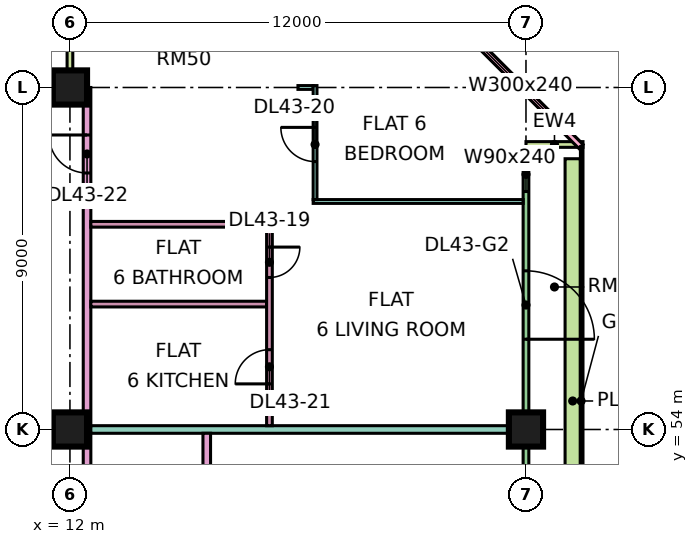
"""IFC4 building model, lengths in metres.
Left out: names, types, materials, properties, quantities, classifications, styles, units other than length and angle.
Written with IfcOpenShell. Run it as: python <this file> out.ifc"""

import sys

from ifc_helpers import new_model, si_unit, direction, frame, frame_2d, origin, origin_2d, place, context, subcontext, project, spatial, rectangle, extrude, element, fill, save


model = new_model("IFC4")
c1 = context("Model", 3, precision=1e-05, world=origin(), true_north=direction((0.0, 1.0)))
c2 = subcontext(c1, "Body", "Model", "MODEL_VIEW")
j1 = project(units=[si_unit("LENGTHUNIT", "METRE"), si_unit("PLANEANGLEUNIT", "RADIAN")], contexts=[c1])
p1 = place(None, origin())
s1 = spatial("IfcSite", under=j1, at=p1, CompositionType="ELEMENT")
p2 = place(p1, origin())
s2 = spatial("IfcBuilding", under=s1, at=p2, CompositionType="ELEMENT")
p3 = place(p2, frame((0.0, 0.0, 187.4)))
s3 = spatial("IfcBuildingStorey", under=s2, at=p3, CompositionType="ELEMENT", Elevation=187.4)
for number, where, z_axis, x_axis in (
    (1, (12.0, 54.0, 0.0), (0.0, 0.0, 1.0), (1.0, 0.0, 0.0)),
    (2, (12.0, 63.0, 0.0), (0.0, 0.0, 1.0), (1.0, 0.0, 0.0)),
    (3, (24.0, 54.0, 0.0), (0.0, 0.0, 1.0), (1.0, 0.0, 0.0)),
):
    element("IfcColumn", number, at=place(p3, frame(where, z_axis=z_axis, x_axis=x_axis)), inside=s3, PredefinedType="COLUMN", context=c2, shape_type="SweptSolid", body=[
        extrude(rectangle(XDim=0.9, YDim=0.9, at=origin_2d()), origin(), (0.0, 0.0, 1.0), 3.75),
    ])
p4 = place(p3, frame((24.0, 48.075, 0.0), z_axis=(0.0, 0.0, 1.0), x_axis=(0.0, 1.0, 0.0)))
e4 = element("IfcWall", 4, at=p4, inside=s3, PredefinedType="SOLIDWALL", context=c2, shape_type="SweptSolid", body=[
    extrude(rectangle(XDim=13.35, YDim=0.15, at=frame_2d((6.675, 0.0))), origin(), (0.0, 0.0, 1.0), 3.35),
])
p5 = place(p4, frame((0.587, 0.0, 0.45)))
e5 = element("IfcOpeningElement", 5, at=p5, cuts=e4, PredefinedType="OPENING", context=c2, shape_type="SweptSolid", body=[
    extrude(rectangle(XDim=4.2, YDim=2.4, at=frame_2d((2.1, 1.2))), frame((0.0, 0.085, 0.0), z_axis=(0.0, -1.0, 0.0), x_axis=(1.0, 0.0, 0.0)), (0.0, 0.0, 1.0), 0.17),
])
p6 = place(p4, frame((8.3, 0.0, 0.0)))
e6 = element("IfcOpeningElement", 6, at=p6, cuts=e4, PredefinedType="OPENING", context=c2, shape_type="SweptSolid", body=[
    extrude(rectangle(XDim=1.8, YDim=2.4, at=frame_2d((0.9, 1.2))), frame((0.0, 0.085, 0.0), z_axis=(0.0, -1.0, 0.0), x_axis=(1.0, 0.0, 0.0)), (0.0, 0.0, 1.0), 0.17),
])
p7 = place(p4, frame((12.188, 0.0, 0.45)))
e7 = element("IfcOpeningElement", 7, at=p7, cuts=e4, PredefinedType="OPENING", context=c2, shape_type="SweptSolid", body=[
    extrude(rectangle(XDim=0.9, YDim=2.4, at=frame_2d((0.45, 1.2))), frame((0.0, 0.085, 0.0), z_axis=(0.0, -1.0, 0.0), x_axis=(1.0, 0.0, 0.0)), (0.0, 0.0, 1.0), 0.17),
])
p8 = place(p3, frame((25.5, 61.5, 0.0), z_axis=(0.0, 0.0, 1.0), x_axis=(-1.0, 0.0, 0.0)))
e8 = element("IfcWall", 8, at=p8, inside=s3, PredefinedType="SOLIDWALL", context=c2, shape_type="SweptSolid", body=[
    extrude(rectangle(XDim=1.5, YDim=0.15, at=frame_2d((0.75, 0.0))), origin(), (0.0, 0.0, 1.0), 3.35),
])
p9 = place(p3, frame((25.447, 61.447, 0.0), z_axis=(0.0, 0.0, 1.0), x_axis=(-0.707106781187, 0.707106781187, 0.0)))
e9 = element("IfcWall", 9, at=p9, inside=s3, PredefinedType="SOLIDWALL", context=c2, shape_type="SweptSolid", body=[
    extrude(rectangle(XDim=4.243, YDim=0.15, at=frame_2d((2.121, 0.0))), origin(), (0.0, 0.0, 1.0), 3.35),
])
p10 = place(p9, frame((0.744, 0.0, 0.45)))
e10 = element("IfcOpeningElement", 10, at=p10, cuts=e9, PredefinedType="OPENING", context=c2, shape_type="SweptSolid", body=[
    extrude(rectangle(XDim=3.0, YDim=2.4, at=frame_2d((1.5, 1.2))), frame((0.0, 0.085, 0.0), z_axis=(0.0, -1.0, 0.0), x_axis=(1.0, 0.0, 0.0)), (0.0, 0.0, 1.0), 0.17),
])
p11 = place(p3, frame((11.925, 63.0, 0.0), z_axis=(0.0, 0.0, 1.0), x_axis=(-1.0, 0.0, 0.0)))
e11 = element("IfcWall", 11, at=p11, inside=s3, PredefinedType="SOLIDWALL", context=c2, shape_type="SweptSolid", body=[
    extrude(rectangle(XDim=10.35, YDim=0.15, at=frame_2d((5.175, 0.0))), origin(), (0.0, 0.0, 1.0), 3.35),
])
p12 = place(p11, frame((2.775, 0.0, 0.45)))
e12 = element("IfcOpeningElement", 12, at=p12, cuts=e11, PredefinedType="OPENING", context=c2, shape_type="SweptSolid", body=[
    extrude(rectangle(XDim=1.8, YDim=2.4, at=frame_2d((0.9, 1.2))), frame((0.0, 0.085, 0.0), z_axis=(0.0, -1.0, 0.0), x_axis=(1.0, 0.0, 0.0)), (0.0, 0.0, 1.0), 0.17),
])
p13 = place(p11, frame((7.387, 0.0, 0.0)))
e13 = element("IfcOpeningElement", 13, at=p13, cuts=e11, PredefinedType="OPENING", context=c2, shape_type="SweptSolid", body=[
    extrude(rectangle(XDim=1.8, YDim=2.4, at=frame_2d((0.9, 1.2))), frame((0.0, 0.085, 0.0), z_axis=(0.0, -1.0, 0.0), x_axis=(1.0, 0.0, 0.0)), (0.0, 0.0, 1.0), 0.17),
])
p14 = place(p3, frame((12.0, 64.5, 0.0), z_axis=(0.0, 0.0, 1.0), x_axis=(0.0, -1.0, 0.0)))
e14 = element("IfcWall", 14, at=p14, inside=s3, PredefinedType="SOLIDWALL", context=c2, shape_type="SweptSolid", body=[
    extrude(rectangle(XDim=1.5, YDim=0.15, at=frame_2d((0.75, 0.0))), origin(), (0.0, 0.0, 1.0), 3.35),
])
p15 = place(p3, frame((25.229, 48.375, 0.0), z_axis=(0.0, 0.0, 1.0), x_axis=(0.0, 1.0, 0.0)))
e15 = element("IfcWall", 15, at=p15, inside=s3, PredefinedType="SOLIDWALL", context=c2, shape_type="SweptSolid", body=[
    extrude(rectangle(XDim=12.75, YDim=0.4, at=frame_2d((6.375, 0.0))), origin(), (0.0, 0.0, 1.0), 0.7),
])
p16 = place(p3, frame((12.45, 20.0, 0.0), z_axis=(0.0, 0.0, 1.0), x_axis=(0.0, 1.0, 0.0)))
e16 = element("IfcWall", 16, at=p16, inside=s3, PredefinedType="PARTITIONING", context=c2, shape_type="SweptSolid", body=[
    extrude(rectangle(XDim=43.0, YDim=0.2, at=frame_2d((21.5, 0.0))), origin(), (0.0, 0.0, 1.0), 3.35),
])
p17 = place(p16, frame((6.7, 0.0, 0.0)))
e17 = element("IfcOpeningElement", 17, at=p17, cuts=e16, PredefinedType="OPENING", context=c2, shape_type="SweptSolid", body=[
    extrude(rectangle(XDim=1.6, YDim=2.1, at=frame_2d((0.8, 1.05))), frame((0.0, 0.11, 0.0), z_axis=(0.0, -1.0, 0.0), x_axis=(1.0, 0.0, 0.0)), (0.0, 0.0, 1.0), 0.22),
])
p18 = place(p16, frame((12.95, 0.0, 0.0)))
e18 = element("IfcOpeningElement", 18, at=p18, cuts=e16, PredefinedType="OPENING", context=c2, shape_type="SweptSolid", body=[
    extrude(rectangle(XDim=1.0, YDim=2.1, at=frame_2d((0.5, 1.05))), frame((0.0, 0.11, 0.0), z_axis=(0.0, -1.0, 0.0), x_axis=(1.0, 0.0, 0.0)), (0.0, 0.0, 1.0), 0.22),
])
p19 = place(p16, frame((16.9, 0.0, 0.0)))
e19 = element("IfcOpeningElement", 19, at=p19, cuts=e16, PredefinedType="OPENING", context=c2, shape_type="SweptSolid", body=[
    extrude(rectangle(XDim=1.0, YDim=2.1, at=frame_2d((0.5, 1.05))), frame((0.0, 0.11, 0.0), z_axis=(0.0, -1.0, 0.0), x_axis=(1.0, 0.0, 0.0)), (0.0, 0.0, 1.0), 0.22),
])
p20 = place(p16, frame((40.75, 0.0, 0.0)))
e20 = element("IfcOpeningElement", 20, at=p20, cuts=e16, PredefinedType="OPENING", context=c2, shape_type="SweptSolid", body=[
    extrude(rectangle(XDim=1.0, YDim=2.1, at=frame_2d((0.5, 1.05))), frame((0.0, 0.11, 0.0), z_axis=(0.0, -1.0, 0.0), x_axis=(1.0, 0.0, 0.0)), (0.0, 0.0, 1.0), 0.22),
])
p21 = place(p16, frame((1.15, 0.0, 0.0)))
e21 = element("IfcOpeningElement", 21, at=p21, cuts=e16, PredefinedType="OPENING", context=c2, shape_type="SweptSolid", body=[
    extrude(rectangle(XDim=1.8, YDim=2.1, at=frame_2d((0.9, 1.05))), frame((0.0, 0.11, 0.0), z_axis=(0.0, -1.0, 0.0), x_axis=(1.0, 0.0, 0.0)), (0.0, 0.0, 1.0), 0.22),
])
p22 = place(p16, frame((28.6, 0.0, 0.0)))
e22 = element("IfcOpeningElement", 22, at=p22, cuts=e16, PredefinedType="OPENING", context=c2, shape_type="SweptSolid", body=[
    extrude(rectangle(XDim=1.8, YDim=2.1, at=frame_2d((0.9, 1.05))), frame((0.0, 0.11, 0.0), z_axis=(0.0, -1.0, 0.0), x_axis=(1.0, 0.0, 0.0)), (0.0, 0.0, 1.0), 0.22),
])
p23 = place(p3, frame((12.55, 54.0, 0.0), z_axis=(0.0, 0.0, 1.0), x_axis=(1.0, 0.0, 0.0)))
e23 = element("IfcWall", 23, at=p23, inside=s3, PredefinedType="PARTITIONING", context=c2, shape_type="SweptSolid", body=[
    extrude(rectangle(XDim=11.376, YDim=0.2, at=frame_2d((5.688, 0.0))), origin(), (0.0, 0.0, 1.0), 3.35),
])
for number, where, z_axis, x_axis in (
    (24, (12.55, 57.3, 0.0), (0.0, 0.0, 1.0), (1.0, 0.0, 0.0)),
    (25, (12.55, 59.4, 0.0), (0.0, 0.0, 1.0), (1.0, 0.0, 0.0)),
):
    element("IfcWall", number, at=place(p3, frame(where, z_axis=z_axis, x_axis=x_axis)), inside=s3, PredefinedType="PARTITIONING", context=c2, shape_type="SweptSolid", body=[
        extrude(rectangle(XDim=4.625, YDim=0.15, at=frame_2d((2.312, 0.0))), origin(), (0.0, 0.0, 1.0), 3.35),
    ])
p24 = place(p3, frame((15.6, 51.225, 0.0), z_axis=(0.0, 0.0, 1.0), x_axis=(0.0, 1.0, 0.0)))
e26 = element("IfcWall", 26, at=p24, inside=s3, PredefinedType="PARTITIONING", context=c2, shape_type="SweptSolid", body=[
    extrude(rectangle(XDim=2.675, YDim=0.2, at=frame_2d((1.337, 0.0))), origin(), (0.0, 0.0, 1.0), 3.35),
])
p25 = place(p3, frame((17.25, 54.1, 0.0), z_axis=(0.0, 0.0, 1.0), x_axis=(0.0, 1.0, 0.0)))
e27 = element("IfcWall", 27, at=p25, inside=s3, PredefinedType="PARTITIONING", context=c2, shape_type="SweptSolid", body=[
    extrude(rectangle(XDim=5.375, YDim=0.15, at=frame_2d((2.688, 0.0))), origin(), (0.0, 0.0, 1.0), 3.35),
])
p26 = place(p25, frame((3.9, 0.0, 0.0)))
e28 = element("IfcOpeningElement", 28, at=p26, cuts=e27, PredefinedType="OPENING", context=c2, shape_type="SweptSolid", body=[
    extrude(rectangle(XDim=0.8, YDim=2.1, at=frame_2d((0.4, 1.05))), frame((0.0, 0.085, 0.0), z_axis=(0.0, -1.0, 0.0), x_axis=(1.0, 0.0, 0.0)), (0.0, 0.0, 1.0), 0.17),
])
p27 = place(p25, frame((1.1, 0.0, 0.0)))
e29 = element("IfcOpeningElement", 29, at=p27, cuts=e27, PredefinedType="OPENING", context=c2, shape_type="SweptSolid", body=[
    extrude(rectangle(XDim=0.9, YDim=2.1, at=frame_2d((0.45, 1.05))), frame((0.0, 0.085, 0.0), z_axis=(0.0, -1.0, 0.0), x_axis=(1.0, 0.0, 0.0)), (0.0, 0.0, 1.0), 0.17),
])
p28 = place(p3, frame((18.0, 63.0, 0.0), z_axis=(0.0, 0.0, 1.0), x_axis=(1.0, 0.0, 0.0)))
e30 = element("IfcWall", 30, at=p28, inside=s3, PredefinedType="PARTITIONING", context=c2, shape_type="SweptSolid", body=[
    extrude(rectangle(XDim=0.4, YDim=0.1, at=frame_2d((0.2, 0.0))), origin(), (0.0, 0.0, 1.0), 3.35),
])
p29 = place(p3, frame((18.4, 60.0, 0.0), z_axis=(0.0, 0.0, 1.0), x_axis=(1.0, 0.0, 0.0)))
e31 = element("IfcWall", 31, at=p29, inside=s3, PredefinedType="PARTITIONING", context=c2, shape_type="SweptSolid", body=[
    extrude(rectangle(XDim=5.526, YDim=0.1, at=frame_2d((2.763, 0.0))), origin(), (0.0, 0.0, 1.0), 3.35),
])
p30 = place(p3, frame((18.45, 60.05, 0.0), z_axis=(0.0, 0.0, 1.0), x_axis=(0.0, 1.0, 0.0)))
e32 = element("IfcWall", 32, at=p30, inside=s3, PredefinedType="PARTITIONING", context=c2, shape_type="SweptSolid", body=[
    extrude(rectangle(XDim=3.0, YDim=0.1, at=frame_2d((1.5, 0.0))), origin(), (0.0, 0.0, 1.0), 3.35),
])
p31 = place(p30, frame((1.0, 0.0, 0.0)))
e33 = element("IfcOpeningElement", 33, at=p31, cuts=e32, PredefinedType="OPENING", context=c2, shape_type="SweptSolid", body=[
    extrude(rectangle(XDim=0.9, YDim=2.1, at=frame_2d((0.45, 1.05))), frame((0.0, 0.06, 0.0), z_axis=(0.0, -1.0, 0.0), x_axis=(1.0, 0.0, 0.0)), (0.0, 0.0, 1.0), 0.12),
])
p32 = place(p6, frame((1.8, 0.0, 0.0), z_axis=(0.0, 0.0, 1.0), x_axis=(-1.0, 0.0, 0.0)))
e34 = element("IfcDoor", 34, at=p32, inside=s3, OperationType="DOUBLE_DOOR_SINGLE_SWING", PredefinedType="DOOR", context=c2, shape_type="SweptSolid", body=[
    extrude(rectangle(XDim=1.8, YDim=2.4, at=frame_2d((0.9, 1.2))), frame((0.0, 0.025, 0.0), z_axis=(0.0, -1.0, 0.0), x_axis=(1.0, 0.0, 0.0)), (0.0, 0.0, 1.0), 0.05),
])
fill(e6, e34)
p33 = place(p7, origin())
e35 = element("IfcWindow", 35, at=p33, inside=s3, PartitioningType="SINGLE_PANEL", PredefinedType="WINDOW", context=c2, shape_type="SweptSolid", body=[
    extrude(rectangle(XDim=0.9, YDim=2.4, at=frame_2d((0.45, 1.2))), frame((0.0, 0.03, 0.0), z_axis=(0.0, -1.0, 0.0), x_axis=(1.0, 0.0, 0.0)), (0.0, 0.0, 1.0), 0.06),
])
fill(e7, e35)
p34 = place(p10, origin())
e36 = element("IfcWindow", 36, at=p34, inside=s3, PartitioningType="SINGLE_PANEL", PredefinedType="WINDOW", context=c2, shape_type="SweptSolid", body=[
    extrude(rectangle(XDim=3.0, YDim=2.4, at=frame_2d((1.5, 1.2))), frame((0.0, 0.03, 0.0), z_axis=(0.0, -1.0, 0.0), x_axis=(1.0, 0.0, 0.0)), (0.0, 0.0, 1.0), 0.06),
])
fill(e10, e36)
p35 = place(p26, origin())
e37 = element("IfcDoor", 37, at=p35, inside=s3, OperationType="SINGLE_SWING_RIGHT", PredefinedType="DOOR", context=c2, shape_type="SweptSolid", body=[
    extrude(rectangle(XDim=0.8, YDim=2.1, at=frame_2d((0.4, 1.05))), frame((0.0, 0.025, 0.0), z_axis=(0.0, -1.0, 0.0), x_axis=(1.0, 0.0, 0.0)), (0.0, 0.0, 1.0), 0.05),
])
fill(e28, e37)
p36 = place(p31, frame((0.9, 0.0, 0.0), z_axis=(0.0, 0.0, 1.0), x_axis=(-1.0, 0.0, 0.0)))
e38 = element("IfcDoor", 38, at=p36, inside=s3, OperationType="SINGLE_SWING_RIGHT", PredefinedType="DOOR", context=c2, shape_type="SweptSolid", body=[
    extrude(rectangle(XDim=0.9, YDim=2.1, at=frame_2d((0.45, 1.05))), frame((0.0, 0.025, 0.0), z_axis=(0.0, -1.0, 0.0), x_axis=(1.0, 0.0, 0.0)), (0.0, 0.0, 1.0), 0.05),
])
fill(e33, e38)
p37 = place(p27, origin())
e39 = element("IfcDoor", 39, at=p37, inside=s3, OperationType="SINGLE_SWING_LEFT", PredefinedType="DOOR", context=c2, shape_type="SweptSolid", body=[
    extrude(rectangle(XDim=0.9, YDim=2.1, at=frame_2d((0.45, 1.05))), frame((0.0, 0.025, 0.0), z_axis=(0.0, -1.0, 0.0), x_axis=(1.0, 0.0, 0.0)), (0.0, 0.0, 1.0), 0.05),
])
fill(e29, e39)
p38 = place(p20, frame((1.0, 0.0, 0.0), z_axis=(0.0, 0.0, 1.0), x_axis=(-1.0, 0.0, 0.0)))
e40 = element("IfcDoor", 40, at=p38, inside=s3, OperationType="SINGLE_SWING_RIGHT", PredefinedType="DOOR", context=c2, shape_type="SweptSolid", body=[
    extrude(rectangle(XDim=1.0, YDim=2.1, at=frame_2d((0.5, 1.05))), frame((0.0, 0.025, 0.0), z_axis=(0.0, -1.0, 0.0), x_axis=(1.0, 0.0, 0.0)), (0.0, 0.0, 1.0), 0.05),
])
fill(e20, e40)
save(model, sys.argv[1])
